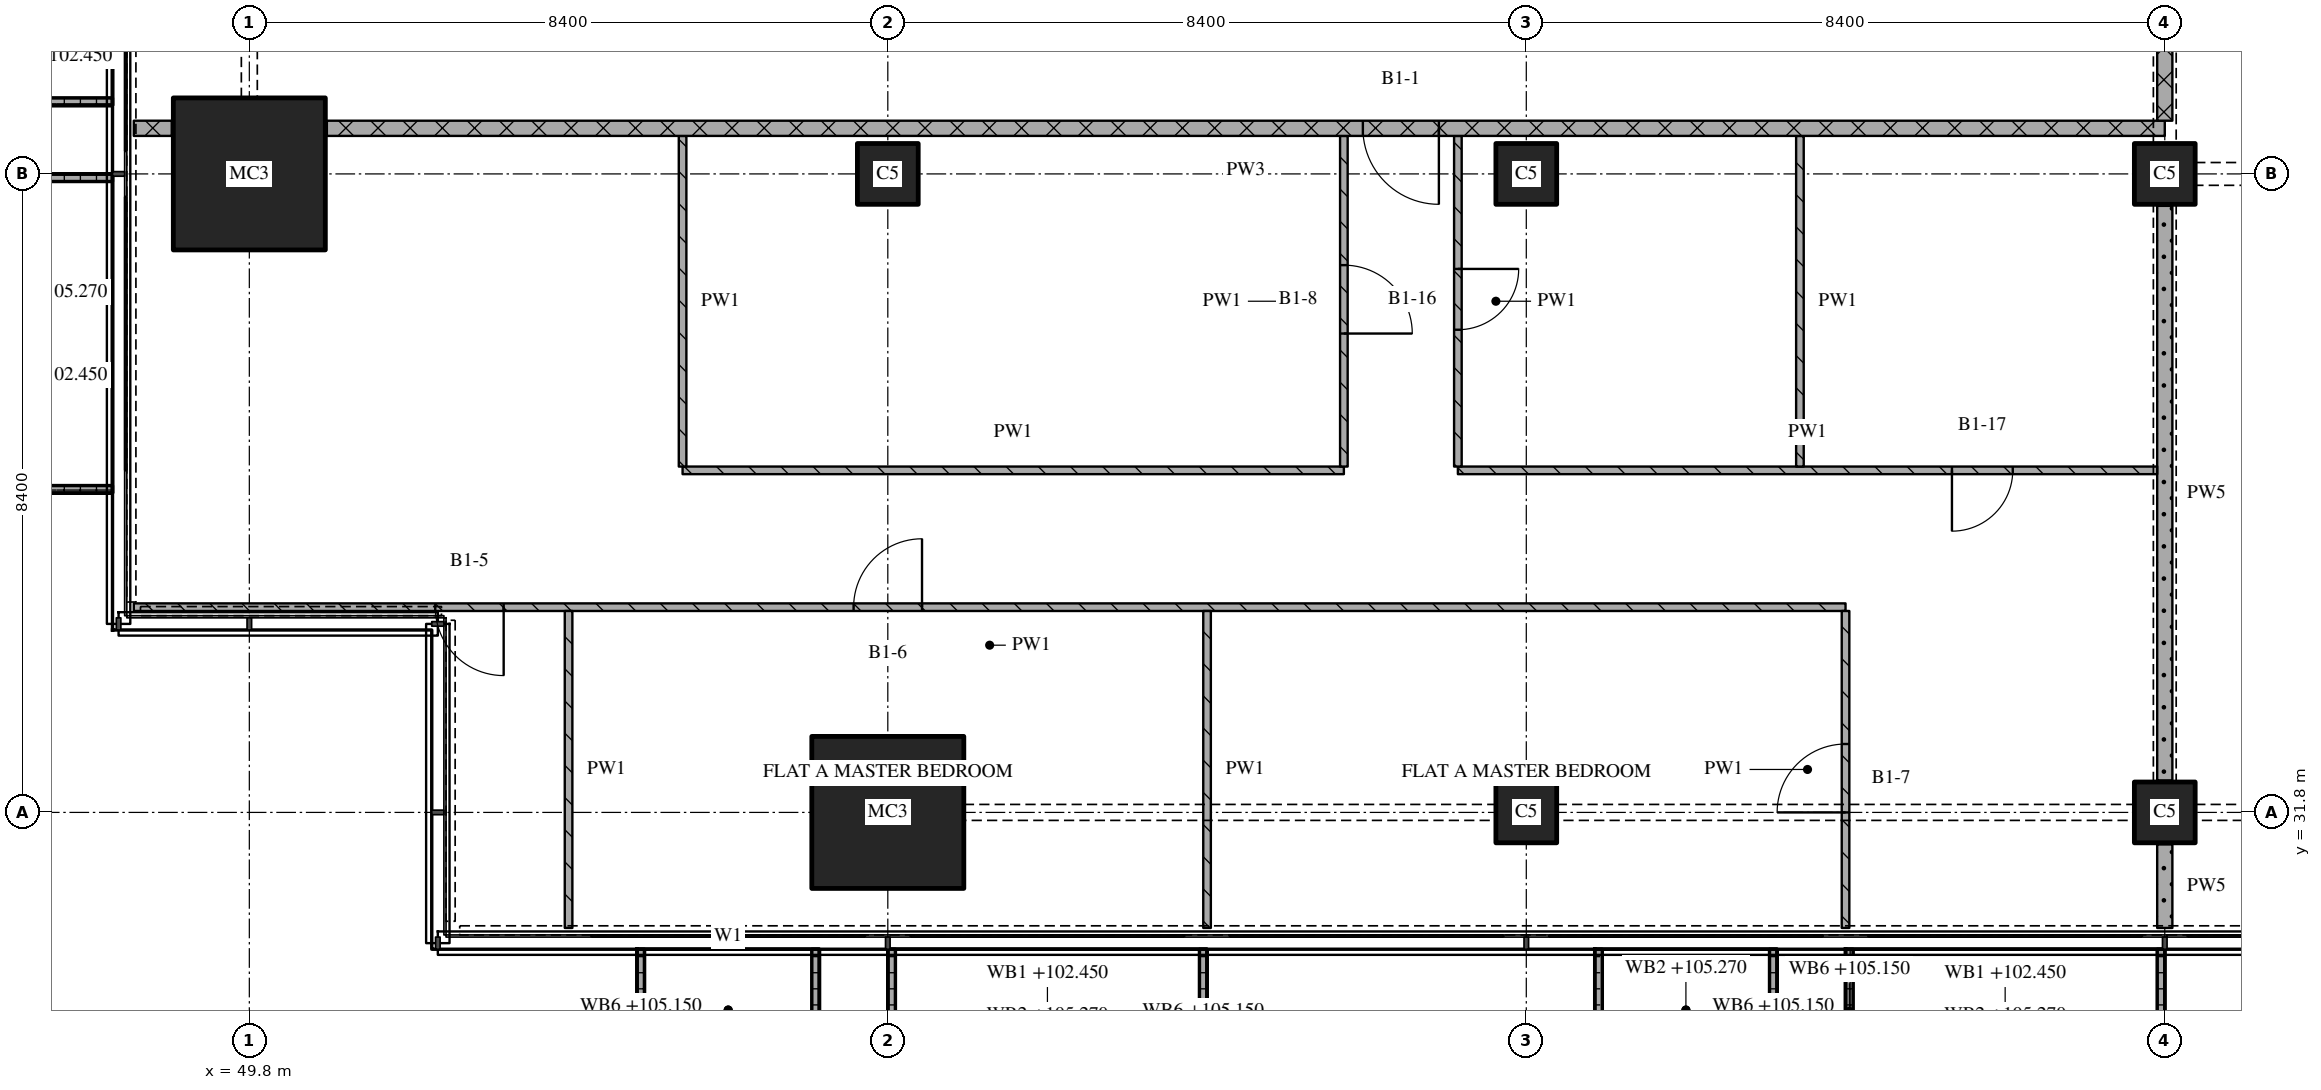
"""IFC4 building model, lengths in metres.
Left out: names, types, materials, properties, quantities, classifications, styles, units other than length and angle.
Written with IfcOpenShell. Run it as: python <this file> out.ifc"""

import sys

from ifc_helpers import new_model, si_unit, direction, frame, frame_2d, origin, origin_2d, place, context, subcontext, project, spatial, polyline, rectangle, outline, extrude, element, fill, save


model = new_model("IFC4")
c1 = context("Model", 3, precision=1e-05, world=origin(), true_north=direction((0.0, 1.0)))
c2 = subcontext(c1, "Body", "Model", "MODEL_VIEW")
j1 = project(units=[si_unit("LENGTHUNIT", "METRE"), si_unit("PLANEANGLEUNIT", "RADIAN")], contexts=[c1])
p1 = place(None, origin())
s1 = spatial("IfcSite", under=j1, at=p1, CompositionType="ELEMENT")
p2 = place(p1, origin())
s2 = spatial("IfcBuilding", under=s1, at=p2, CompositionType="ELEMENT")
p3 = place(p2, frame((0.0, 0.0, 102.45)))
s3 = spatial("IfcBuildingStorey", under=s2, at=p3, CompositionType="ELEMENT", Elevation=102.45)
for number, where, z_axis, x_axis in (
    (1, (49.8, 40.2, 0.0), (0.0, 0.0, 1.0), (1.0, 0.0, 0.0)),
    (2, (58.2, 31.8, 0.0), (0.0, 0.0, 1.0), (1.0, 0.0, 0.0)),
):
    element("IfcColumn", number, at=place(p3, frame(where, z_axis=z_axis, x_axis=x_axis)), inside=s3, PredefinedType="COLUMN", context=c2, shape_type="SweptSolid", body=[
        extrude(rectangle(XDim=2.0, YDim=2.0, at=origin_2d()), origin(), (0.0, 0.0, 1.0), 3.6),
    ])
for number, where, z_axis, x_axis in (
    (3, (58.2, 40.2, 0.0), (0.0, 0.0, 1.0), (1.0, 0.0, 0.0)),
    (4, (66.6, 31.8, 0.0), (0.0, 0.0, 1.0), (1.0, 0.0, 0.0)),
    (5, (66.6, 40.2, 0.0), (0.0, 0.0, 1.0), (1.0, 0.0, 0.0)),
    (6, (75.0, 31.8, 0.0), (0.0, 0.0, 1.0), (1.0, 0.0, 0.0)),
    (7, (75.0, 40.2, 0.0), (0.0, 0.0, 1.0), (1.0, 0.0, 0.0)),
):
    element("IfcColumn", number, at=place(p3, frame(where, z_axis=z_axis, x_axis=x_axis)), inside=s3, PredefinedType="COLUMN", context=c2, shape_type="SweptSolid", body=[
        extrude(rectangle(XDim=0.8, YDim=0.8, at=origin_2d()), origin(), (0.0, 0.0, 1.0), 3.6),
    ])
p4 = place(p3, origin())
e8 = element("IfcWall", 8, at=p4, inside=s3, PredefinedType="SOLIDWALL", context=c2, shape_type="SweptSolid", body=[
    extrude(outline(polyline([(54.9, 30.0), (55.0, 30.0), (55.0, 28.5), (57.2, 28.5), (57.2, 30.0), (57.3, 30.0), (57.3, 28.4), (54.9, 28.4), (54.9, 30.0)])), origin(), (0.0, 0.0, 1.0), 1.0),
])
p5 = place(p3, origin())
e9 = element("IfcWall", 9, at=p5, inside=s3, PredefinedType="SOLIDWALL", context=c2, shape_type="SweptSolid", body=[
    extrude(outline(polyline([(58.2, 30.0), (58.3, 30.0), (58.3, 28.367), (62.3, 28.367), (62.3, 30.0), (62.4, 30.0), (62.4, 28.267), (58.2, 28.267), (58.2, 30.0)])), origin(), (0.0, 0.0, 1.0), 1.0),
])
p6 = place(p3, origin())
e10 = element("IfcWall", 10, at=p6, inside=s3, PredefinedType="SOLIDWALL", context=c2, shape_type="SweptSolid", body=[
    extrude(outline(polyline([(67.5, 30.0), (67.6, 30.0), (67.6, 28.5), (69.8, 28.5), (69.8, 30.0), (69.9, 30.0), (69.9, 28.4), (67.5, 28.4), (67.5, 30.0)])), origin(), (0.0, 0.0, 1.0), 1.0),
])
p7 = place(p3, origin())
e11 = element("IfcWall", 11, at=p7, inside=s3, PredefinedType="SOLIDWALL", context=c2, shape_type="SweptSolid", body=[
    extrude(outline(polyline([(70.8, 30.0), (70.9, 30.0), (70.9, 28.367), (74.9, 28.367), (74.9, 30.0), (75.0, 30.0), (75.0, 28.267), (70.8, 28.267), (70.8, 30.0)])), origin(), (0.0, 0.0, 1.0), 1.0),
])
p8 = place(p3, origin())
e12 = element("IfcWall", 12, at=p8, inside=s3, PredefinedType="SOLIDWALL", context=c2, shape_type="SweptSolid", body=[
    extrude(outline(polyline([(48.0, 43.5), (48.0, 43.4), (46.5, 43.4), (46.5, 41.2), (48.0, 41.2), (48.0, 41.1), (46.4, 41.1), (46.4, 43.5), (48.0, 43.5)])), origin(), (0.0, 0.0, 1.0), 1.0),
])
p9 = place(p3, origin())
e13 = element("IfcWall", 13, at=p9, inside=s3, PredefinedType="SOLIDWALL", context=c2, shape_type="SweptSolid", body=[
    extrude(outline(polyline([(48.0, 40.2), (48.0, 40.1), (46.367, 40.1), (46.367, 36.1), (48.0, 36.1), (48.0, 36.0), (46.267, 36.0), (46.267, 40.2), (48.0, 40.2)])), origin(), (0.0, 0.0, 1.0), 1.0),
])
p10 = place(p3, frame((70.8, 34.5, 0.0), z_axis=(0.0, 0.0, 1.0), x_axis=(-1.0, 0.0, 0.0)))
e14 = element("IfcWall", 14, at=p10, inside=s3, PredefinedType="PARTITIONING", context=c2, shape_type="SweptSolid", body=[
    extrude(rectangle(XDim=22.52, YDim=0.1, at=frame_2d((11.26, 0.0))), origin(), (0.0, 0.0, 1.0), 3.32),
])
p11 = place(p10, frame((12.15, 0.0, 0.0)))
e15 = element("IfcOpeningElement", 15, at=p11, cuts=e14, PredefinedType="OPENING", context=c2, shape_type="SweptSolid", body=[
    extrude(rectangle(XDim=0.9, YDim=2.1, at=frame_2d((0.45, 1.05))), frame((0.0, 0.06, 0.0), z_axis=(0.0, -1.0, 0.0), x_axis=(1.0, 0.0, 0.0)), (0.0, 0.0, 1.0), 0.12),
])
p12 = place(p10, frame((17.654, 0.0, 0.0)))
e16 = element("IfcOpeningElement", 16, at=p12, cuts=e14, PredefinedType="OPENING", context=c2, shape_type="SweptSolid", body=[
    extrude(rectangle(XDim=0.9, YDim=2.1, at=frame_2d((0.45, 1.05))), frame((0.0, 0.06, 0.0), z_axis=(0.0, -1.0, 0.0), x_axis=(1.0, 0.0, 0.0)), (0.0, 0.0, 1.0), 0.12),
])
p13 = place(p3, frame((55.5, 36.3, 0.0), z_axis=(0.0, 0.0, 1.0), x_axis=(1.0, 0.0, 0.0)))
e17 = element("IfcWall", 17, at=p13, inside=s3, PredefinedType="PARTITIONING", context=c2, shape_type="SweptSolid", body=[
    extrude(rectangle(XDim=8.7, YDim=0.1, at=frame_2d((4.35, 0.0))), origin(), (0.0, 0.0, 1.0), 3.32),
])
p14 = place(p3, frame((65.7, 36.3, 0.0), z_axis=(0.0, 0.0, 1.0), x_axis=(1.0, 0.0, 0.0)))
e18 = element("IfcWall", 18, at=p14, inside=s3, PredefinedType="PARTITIONING", context=c2, shape_type="SweptSolid", body=[
    extrude(rectangle(XDim=9.2, YDim=0.1, at=frame_2d((4.6, 0.0))), origin(), (0.0, 0.0, 1.0), 3.32),
])
p15 = place(p14, frame((6.5, 0.0, 0.0)))
e19 = element("IfcOpeningElement", 19, at=p15, cuts=e18, PredefinedType="OPENING", context=c2, shape_type="SweptSolid", body=[
    extrude(rectangle(XDim=0.8, YDim=2.1, at=frame_2d((0.4, 1.05))), frame((0.0, 0.06, 0.0), z_axis=(0.0, -1.0, 0.0), x_axis=(1.0, 0.0, 0.0)), (0.0, 0.0, 1.0), 0.12),
])
p16 = place(p3, frame((48.28, 40.8, 0.0), z_axis=(0.0, 0.0, 1.0), x_axis=(1.0, 0.0, 0.0)))
e20 = element("IfcWall", 20, at=p16, inside=s3, PredefinedType="PARTITIONING", context=c2, shape_type="SweptSolid", body=[
    extrude(rectangle(XDim=0.5, YDim=0.2, at=frame_2d((0.25, 0.0))), origin(), (0.0, 0.0, 1.0), 3.32),
])
p17 = place(p3, frame((75.0, 40.8, 0.0), z_axis=(0.0, 0.0, 1.0), x_axis=(-1.0, 0.0, 0.0)))
e21 = element("IfcWall", 21, at=p17, inside=s3, PredefinedType="PARTITIONING", context=c2, shape_type="SweptSolid", body=[
    extrude(rectangle(XDim=24.18, YDim=0.2, at=frame_2d((12.09, 0.0))), origin(), (0.0, 0.0, 1.0), 3.32),
])
p18 = place(p17, frame((9.55, 0.0, 0.0)))
e22 = element("IfcOpeningElement", 22, at=p18, cuts=e21, PredefinedType="OPENING", context=c2, shape_type="SweptSolid", body=[
    extrude(rectangle(XDim=1.0, YDim=2.1, at=frame_2d((0.5, 1.05))), frame((0.0, 0.11, 0.0), z_axis=(0.0, -1.0, 0.0), x_axis=(1.0, 0.0, 0.0)), (0.0, 0.0, 1.0), 0.22),
])
p19 = place(p3, frame((54.0, 34.45, 0.0), z_axis=(0.0, 0.0, 1.0), x_axis=(0.0, -1.0, 0.0)))
e23 = element("IfcWall", 23, at=p19, inside=s3, PredefinedType="PARTITIONING", context=c2, shape_type="SweptSolid", body=[
    extrude(rectangle(XDim=4.17, YDim=0.1, at=frame_2d((2.085, 0.0))), origin(), (0.0, 0.0, 1.0), 3.32),
])
p20 = place(p3, frame((55.5, 40.7, 0.0), z_axis=(0.0, 0.0, 1.0), x_axis=(0.0, -1.0, 0.0)))
e24 = element("IfcWall", 24, at=p20, inside=s3, PredefinedType="PARTITIONING", context=c2, shape_type="SweptSolid", body=[
    extrude(rectangle(XDim=4.35, YDim=0.1, at=frame_2d((2.175, 0.0))), origin(), (0.0, 0.0, 1.0), 3.32),
])
p21 = place(p3, frame((62.4, 34.45, 0.0), z_axis=(0.0, 0.0, 1.0), x_axis=(0.0, -1.0, 0.0)))
e25 = element("IfcWall", 25, at=p21, inside=s3, PredefinedType="PARTITIONING", context=c2, shape_type="SweptSolid", body=[
    extrude(rectangle(XDim=4.17, YDim=0.1, at=frame_2d((2.085, 0.0))), origin(), (0.0, 0.0, 1.0), 3.32),
])
p22 = place(p3, frame((64.2, 36.35, 0.0), z_axis=(0.0, 0.0, 1.0), x_axis=(0.0, 1.0, 0.0)))
e26 = element("IfcWall", 26, at=p22, inside=s3, PredefinedType="PARTITIONING", context=c2, shape_type="SweptSolid", body=[
    extrude(rectangle(XDim=4.35, YDim=0.1, at=frame_2d((2.175, 0.0))), origin(), (0.0, 0.0, 1.0), 3.32),
])
p23 = place(p22, frame((1.75, 0.0, 0.0)))
e27 = element("IfcOpeningElement", 27, at=p23, cuts=e26, PredefinedType="OPENING", context=c2, shape_type="SweptSolid", body=[
    extrude(rectangle(XDim=0.9, YDim=2.1, at=frame_2d((0.45, 1.05))), frame((0.0, 0.06, 0.0), z_axis=(0.0, -1.0, 0.0), x_axis=(1.0, 0.0, 0.0)), (0.0, 0.0, 1.0), 0.12),
])
p24 = place(p3, frame((65.7, 40.7, 0.0), z_axis=(0.0, 0.0, 1.0), x_axis=(0.0, -1.0, 0.0)))
e28 = element("IfcWall", 28, at=p24, inside=s3, PredefinedType="PARTITIONING", context=c2, shape_type="SweptSolid", body=[
    extrude(rectangle(XDim=4.35, YDim=0.1, at=frame_2d((2.175, 0.0))), origin(), (0.0, 0.0, 1.0), 3.32),
])
p25 = place(p24, frame((1.75, 0.0, 0.0)))
e29 = element("IfcOpeningElement", 29, at=p25, cuts=e28, PredefinedType="OPENING", context=c2, shape_type="SweptSolid", body=[
    extrude(rectangle(XDim=0.8, YDim=2.1, at=frame_2d((0.4, 1.05))), frame((0.0, 0.06, 0.0), z_axis=(0.0, -1.0, 0.0), x_axis=(1.0, 0.0, 0.0)), (0.0, 0.0, 1.0), 0.12),
])
p26 = place(p3, frame((70.2, 40.7, 0.0), z_axis=(0.0, 0.0, 1.0), x_axis=(0.0, -1.0, 0.0)))
e30 = element("IfcWall", 30, at=p26, inside=s3, PredefinedType="PARTITIONING", context=c2, shape_type="SweptSolid", body=[
    extrude(rectangle(XDim=4.35, YDim=0.1, at=frame_2d((2.175, 0.0))), origin(), (0.0, 0.0, 1.0), 3.32),
])
p27 = place(p3, frame((70.8, 30.28, 0.0), z_axis=(0.0, 0.0, 1.0), x_axis=(0.0, 1.0, 0.0)))
e31 = element("IfcWall", 31, at=p27, inside=s3, PredefinedType="PARTITIONING", context=c2, shape_type="SweptSolid", body=[
    extrude(rectangle(XDim=4.17, YDim=0.1, at=frame_2d((2.085, 0.0))), origin(), (0.0, 0.0, 1.0), 3.32),
])
p28 = place(p27, frame((1.52, 0.0, 0.0)))
e32 = element("IfcOpeningElement", 32, at=p28, cuts=e31, PredefinedType="OPENING", context=c2, shape_type="SweptSolid", body=[
    extrude(rectangle(XDim=0.9, YDim=2.1, at=frame_2d((0.45, 1.05))), frame((0.0, 0.06, 0.0), z_axis=(0.0, -1.0, 0.0), x_axis=(1.0, 0.0, 0.0)), (0.0, 0.0, 1.0), 0.12),
])
p29 = place(p3, frame((75.0, 43.1, 0.0), z_axis=(0.0, 0.0, 1.0), x_axis=(0.0, -1.0, 0.0)))
e33 = element("IfcWall", 33, at=p29, inside=s3, PredefinedType="PARTITIONING", context=c2, shape_type="SweptSolid", body=[
    extrude(rectangle(XDim=2.2, YDim=0.2, at=frame_2d((1.1, 0.0))), origin(), (0.0, 0.0, 1.0), 2.43),
])
p30 = place(p3, frame((75.0, 31.38, 0.0), z_axis=(0.0, 0.0, 1.0), x_axis=(0.0, -1.0, 0.0)))
e34 = element("IfcWall", 34, at=p30, inside=s3, PredefinedType="PARTITIONING", context=c2, shape_type="SweptSolid", body=[
    extrude(rectangle(XDim=1.1, YDim=0.2, at=frame_2d((0.55, 0.0))), origin(), (0.0, 0.0, 1.0), 3.32),
])
p31 = place(p3, frame((75.0, 39.78, 0.0), z_axis=(0.0, 0.0, 1.0), x_axis=(0.0, -1.0, 0.0)))
e35 = element("IfcWall", 35, at=p31, inside=s3, PredefinedType="PARTITIONING", context=c2, shape_type="SweptSolid", body=[
    extrude(rectangle(XDim=7.56, YDim=0.2, at=frame_2d((3.78, 0.0))), origin(), (0.0, 0.0, 1.0), 2.83),
])
p32 = place(p11, origin())
e36 = element("IfcDoor", 36, at=p32, inside=s3, OperationType="SINGLE_SWING_RIGHT", PredefinedType="DOOR", context=c2, shape_type="SweptSolid", body=[
    extrude(rectangle(XDim=0.9, YDim=2.1, at=frame_2d((0.45, 1.05))), frame((0.0, 0.025, 0.0), z_axis=(0.0, -1.0, 0.0), x_axis=(1.0, 0.0, 0.0)), (0.0, 0.0, 1.0), 0.05),
])
fill(e15, e36)
p33 = place(p12, origin())
e37 = element("IfcDoor", 37, at=p33, inside=s3, OperationType="SINGLE_SWING_LEFT", PredefinedType="DOOR", context=c2, shape_type="SweptSolid", body=[
    extrude(rectangle(XDim=0.9, YDim=2.1, at=frame_2d((0.45, 1.05))), frame((0.0, 0.025, 0.0), z_axis=(0.0, -1.0, 0.0), x_axis=(1.0, 0.0, 0.0)), (0.0, 0.0, 1.0), 0.05),
])
fill(e16, e37)
p34 = place(p15, origin())
e38 = element("IfcDoor", 38, at=p34, inside=s3, OperationType="SINGLE_SWING_RIGHT", PredefinedType="DOOR", context=c2, shape_type="SweptSolid", body=[
    extrude(rectangle(XDim=0.8, YDim=2.1, at=frame_2d((0.4, 1.05))), frame((0.0, 0.025, 0.0), z_axis=(0.0, -1.0, 0.0), x_axis=(1.0, 0.0, 0.0)), (0.0, 0.0, 1.0), 0.05),
])
fill(e19, e38)
p35 = place(p18, origin())
e39 = element("IfcDoor", 39, at=p35, inside=s3, OperationType="SINGLE_SWING_LEFT", PredefinedType="DOOR", context=c2, shape_type="SweptSolid", body=[
    extrude(rectangle(XDim=1.0, YDim=2.1, at=frame_2d((0.5, 1.05))), frame((0.0, 0.025, 0.0), z_axis=(0.0, -1.0, 0.0), x_axis=(1.0, 0.0, 0.0)), (0.0, 0.0, 1.0), 0.05),
])
fill(e22, e39)
p36 = place(p23, origin())
e40 = element("IfcDoor", 40, at=p36, inside=s3, OperationType="SINGLE_SWING_RIGHT", PredefinedType="DOOR", context=c2, shape_type="SweptSolid", body=[
    extrude(rectangle(XDim=0.9, YDim=2.1, at=frame_2d((0.45, 1.05))), frame((0.0, 0.025, 0.0), z_axis=(0.0, -1.0, 0.0), x_axis=(1.0, 0.0, 0.0)), (0.0, 0.0, 1.0), 0.05),
])
fill(e27, e40)
p37 = place(p25, origin())
e41 = element("IfcDoor", 41, at=p37, inside=s3, OperationType="SINGLE_SWING_LEFT", PredefinedType="DOOR", context=c2, shape_type="SweptSolid", body=[
    extrude(rectangle(XDim=0.8, YDim=2.1, at=frame_2d((0.4, 1.05))), frame((0.0, 0.025, 0.0), z_axis=(0.0, -1.0, 0.0), x_axis=(1.0, 0.0, 0.0)), (0.0, 0.0, 1.0), 0.05),
])
fill(e29, e41)
p38 = place(p28, origin())
e42 = element("IfcDoor", 42, at=p38, inside=s3, OperationType="SINGLE_SWING_LEFT", PredefinedType="DOOR", context=c2, shape_type="SweptSolid", body=[
    extrude(rectangle(XDim=0.9, YDim=2.1, at=frame_2d((0.45, 1.05))), frame((0.0, 0.025, 0.0), z_axis=(0.0, -1.0, 0.0), x_axis=(1.0, 0.0, 0.0)), (0.0, 0.0, 1.0), 0.05),
])
fill(e32, e42)
save(model, sys.argv[1])
